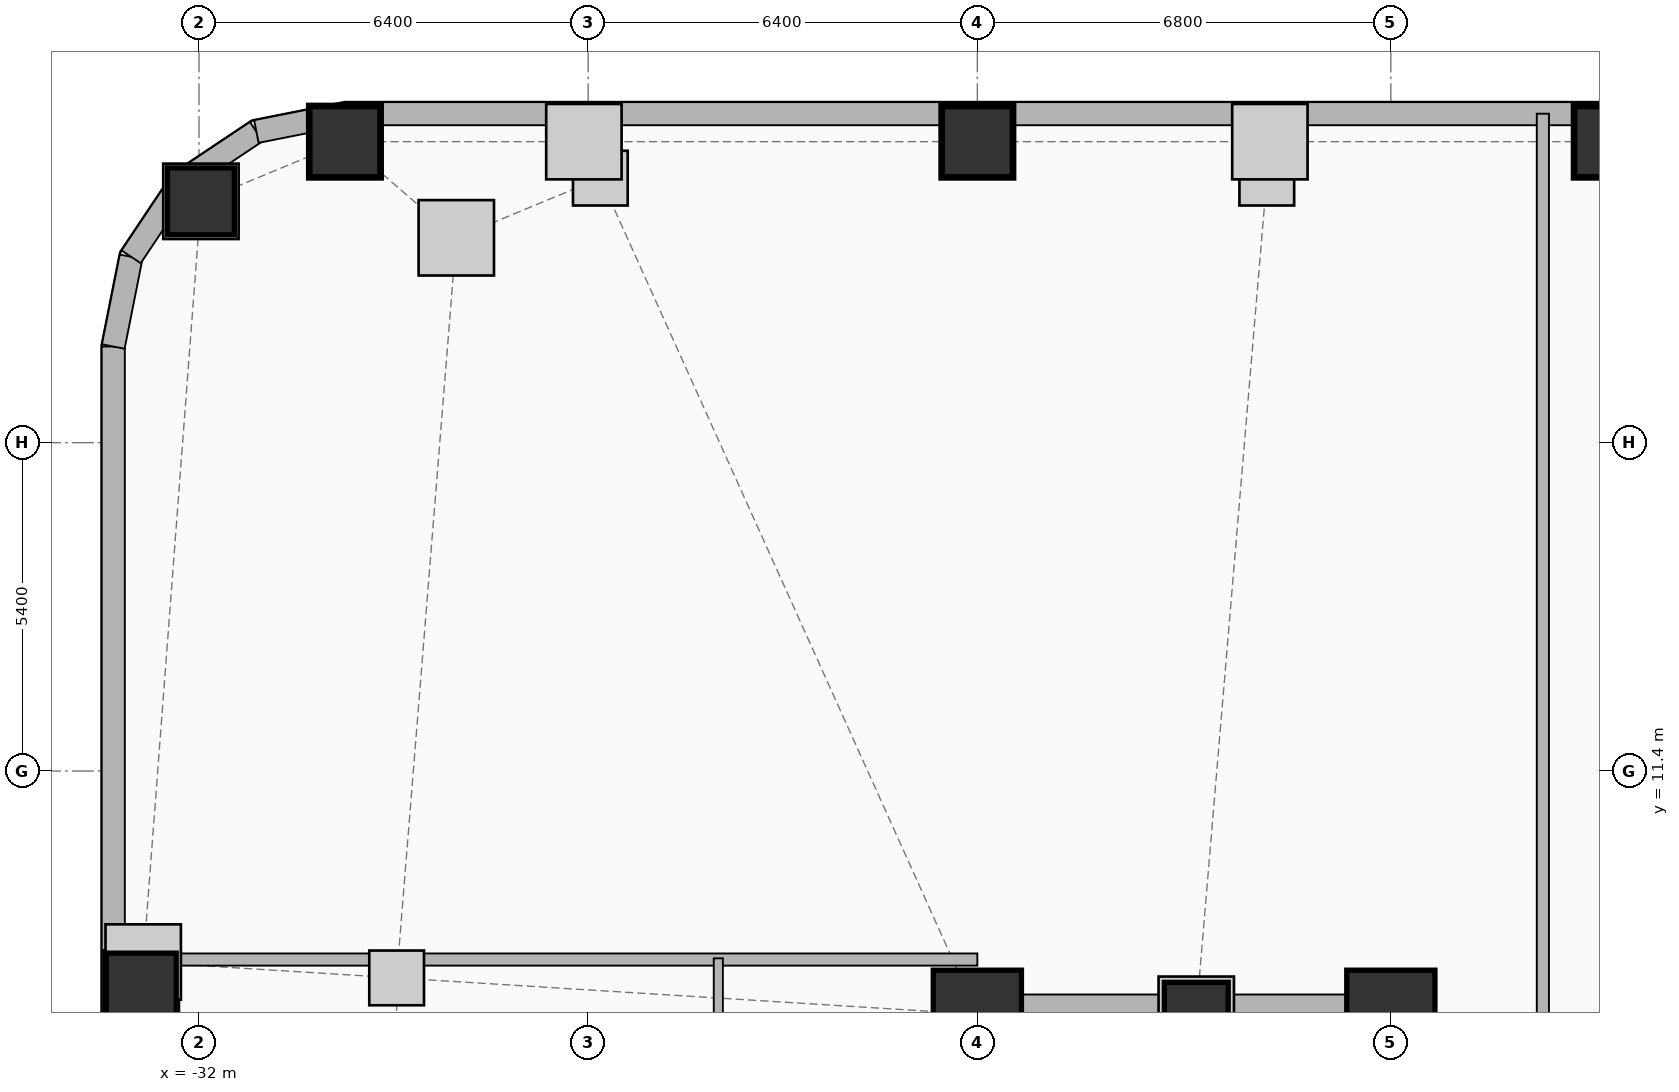
"""IFC4 building model, lengths in metres.
Left out: names, types, materials, properties, quantities, classifications, styles, units other than length and angle.
Written with IfcOpenShell. Run it as: python <this file> out.ifc"""

import sys

from ifc_helpers import new_model, si_unit, direction, frame, frame_2d, origin, origin_2d, place, context, subcontext, project, spatial, rectangle, hollow_rectangle, hollow_circle, extrude, element, fill, save


model = new_model("IFC4")
c1 = context("Model", 3, precision=1e-05, world=origin(), true_north=direction((0.0, 1.0)))
c2 = subcontext(c1, "Body", "Model", "MODEL_VIEW")
j1 = project(units=[si_unit("LENGTHUNIT", "METRE"), si_unit("PLANEANGLEUNIT", "RADIAN")], contexts=[c1])
p1 = place(None, origin())
s1 = spatial("IfcSite", under=j1, at=p1, CompositionType="ELEMENT")
p2 = place(p1, origin())
s2 = spatial("IfcBuilding", under=s1, at=p2, CompositionType="ELEMENT")
p3 = place(p2, frame((0.0, 0.0, 80.6)))
s3 = spatial("IfcBuildingStorey", under=s2, at=p3, CompositionType="ELEMENT", Elevation=80.6)
p4 = place(p3, frame((-19.2, 7.4, 0.0), z_axis=(0.0, 0.0, 1.0), x_axis=(1.0, 0.0, 0.0)))
e1 = element("IfcColumn", 1, at=p4, inside=s3, PredefinedType="COLUMN", context=c2, shape_type="SweptSolid", body=[
    extrude(rectangle(XDim=1.45, YDim=1.45, at=origin_2d()), origin(), (0.0, 0.0, 1.0), 5.2),
])
p5 = place(p3, frame((-15.6, 7.4, 0.0), z_axis=(0.0, 0.0, 1.0), x_axis=(1.0, 0.0, 0.0)))
e2 = element("IfcColumn", 2, at=p5, inside=s3, PredefinedType="COLUMN", context=c2, shape_type="SweptSolid", body=[
    extrude(rectangle(XDim=1.05, YDim=1.05, at=origin_2d()), origin(), (0.0, 0.0, 1.0), 5.2),
])
p6 = place(p3, frame((-12.4, 7.4, 0.0), z_axis=(0.0, 0.0, 1.0), x_axis=(1.0, 0.0, 0.0)))
e3 = element("IfcColumn", 3, at=p6, inside=s3, PredefinedType="COLUMN", context=c2, shape_type="SweptSolid", body=[
    extrude(rectangle(XDim=1.45, YDim=1.45, at=origin_2d()), origin(), (0.0, 0.0, 1.0), 5.2),
])
p7 = place(p3, frame((-19.525, 7.4, 0.0), z_axis=(0.0, 0.0, 1.0), x_axis=(1.0, 0.0, 0.0)))
e4 = element("IfcWall", 4, at=p7, inside=s3, PredefinedType="SHEAR", context=c2, shape_type="SweptSolid", body=[
    extrude(rectangle(XDim=7.45, YDim=0.65, at=frame_2d((3.725, 0.0))), origin(), (0.0, 0.0, 1.0), 4.8),
])
for number, where, z_axis, x_axis in (
    (5, (-8.8, 21.75, 0.0), (0.0, 0.0, 1.0), (1.0, 0.0, 0.0)),
    (6, (-19.2, 21.75, 0.0), (0.0, 0.0, 1.0), (1.0, 0.0, 0.0)),
    (7, (-29.6, 21.75, 0.0), (0.0, 0.0, 1.0), (1.0, 0.0, 0.0)),
):
    element("IfcColumn", number, at=place(p3, frame(where, z_axis=z_axis, x_axis=x_axis)), inside=s3, PredefinedType="COLUMN", context=c2, shape_type="SweptSolid", body=[
        extrude(hollow_rectangle(XDim=1.15, YDim=1.15, WallThickness=0.04, at=origin_2d()), origin(), (0.0, 0.0, 1.0), 5.165),
    ])
p8 = place(p3, frame((-31.969, 20.769, 0.0), z_axis=(0.0, 0.0, 1.0), x_axis=(1.0, 0.0, 0.0)))
e8 = element("IfcColumn", 8, at=p8, inside=s3, PredefinedType="COLUMN", context=c2, shape_type="SweptSolid", body=[
    extrude(hollow_circle(Radius=0.55, WallThickness=0.036, at=origin_2d()), origin(), (0.0, 0.0, 1.0), 5.165),
])
p9 = place(p3, frame((-32.95, 7.83, 0.0), z_axis=(0.0, 0.0, 1.0), x_axis=(1.0, 0.0, 0.0)))
e9 = element("IfcColumn", 9, at=p9, inside=s3, PredefinedType="COLUMN", context=c2, shape_type="SweptSolid", body=[
    extrude(hollow_rectangle(XDim=1.15, YDim=1.15, WallThickness=0.04, at=origin_2d()), origin(), (0.0, 0.0, 1.0), 5.165),
])
p10 = place(p3, frame((-33.41, -18.381, 0.0), z_axis=(0.0, 0.0, 1.0), x_axis=(0.0, 1.0, 0.0)))
e10 = element("IfcWall", 10, at=p10, inside=s3, PredefinedType="ELEMENTEDWALL", context=c2, shape_type="SweptSolid", body=[
    extrude(rectangle(XDim=36.763, YDim=0.38, at=frame_2d((18.381, 0.0))), origin(), (0.0, 0.0, 1.0), 3.69),
])
p11 = place(p10, frame((1.498, 0.0, 0.75)))
e11 = element("IfcOpeningElement", 11, at=p11, cuts=e10, PredefinedType="OPENING", context=c2, shape_type="SweptSolid", body=[
    extrude(rectangle(XDim=1.6, YDim=1.4, at=frame_2d((0.8, 0.7))), frame((0.0, 0.2, 0.0), z_axis=(0.0, -1.0, 0.0), x_axis=(1.0, 0.0, 0.0)), (0.0, 0.0, 1.0), 0.4),
])
p12 = place(p10, frame((6.093, 0.0, 0.75)))
e12 = element("IfcOpeningElement", 12, at=p12, cuts=e10, PredefinedType="OPENING", context=c2, shape_type="SweptSolid", body=[
    extrude(rectangle(XDim=1.6, YDim=1.4, at=frame_2d((0.8, 0.7))), frame((0.0, 0.2, 0.0), z_axis=(0.0, -1.0, 0.0), x_axis=(1.0, 0.0, 0.0)), (0.0, 0.0, 1.0), 0.4),
])
p13 = place(p10, frame((15.284, 0.0, 0.75)))
e13 = element("IfcOpeningElement", 13, at=p13, cuts=e10, PredefinedType="OPENING", context=c2, shape_type="SweptSolid", body=[
    extrude(rectangle(XDim=1.6, YDim=1.4, at=frame_2d((0.8, 0.7))), frame((0.0, 0.2, 0.0), z_axis=(0.0, -1.0, 0.0), x_axis=(1.0, 0.0, 0.0)), (0.0, 0.0, 1.0), 0.4),
])
p14 = place(p10, frame((19.879, 0.0, 0.75)))
e14 = element("IfcOpeningElement", 14, at=p14, cuts=e10, PredefinedType="OPENING", context=c2, shape_type="SweptSolid", body=[
    extrude(rectangle(XDim=1.6, YDim=1.4, at=frame_2d((0.8, 0.7))), frame((0.0, 0.2, 0.0), z_axis=(0.0, -1.0, 0.0), x_axis=(1.0, 0.0, 0.0)), (0.0, 0.0, 1.0), 0.4),
])
p15 = place(p10, frame((29.07, 0.0, 0.75)))
e15 = element("IfcOpeningElement", 15, at=p15, cuts=e10, PredefinedType="OPENING", context=c2, shape_type="SweptSolid", body=[
    extrude(rectangle(XDim=1.6, YDim=1.4, at=frame_2d((0.8, 0.7))), frame((0.0, 0.2, 0.0), z_axis=(0.0, -1.0, 0.0), x_axis=(1.0, 0.0, 0.0)), (0.0, 0.0, 1.0), 0.4),
])
p16 = place(p10, frame((33.665, 0.0, 0.75)))
e16 = element("IfcOpeningElement", 16, at=p16, cuts=e10, PredefinedType="OPENING", context=c2, shape_type="SweptSolid", body=[
    extrude(rectangle(XDim=1.6, YDim=1.4, at=frame_2d((0.8, 0.7))), frame((0.0, 0.2, 0.0), z_axis=(0.0, -1.0, 0.0), x_axis=(1.0, 0.0, 0.0)), (0.0, 0.0, 1.0), 0.4),
])
p17 = place(p3, frame((-33.41, 18.381, 0.0), z_axis=(0.0, 0.0, 1.0), x_axis=(0.195086038585, 0.980786132421, 0.0)))
e17 = element("IfcWall", 17, at=p17, inside=s3, PredefinedType="ELEMENTEDWALL", context=c2, shape_type="SweptSolid", body=[
    extrude(rectangle(XDim=1.504, YDim=0.38, at=frame_2d((0.752, 0.0))), origin(), (0.0, 0.0, 1.0), 4.8),
])
p18 = place(p3, frame((-33.116, 19.857, 0.0), z_axis=(0.0, 0.0, 1.0), x_axis=(0.555572577804, 0.831468045563, 0.0)))
e18 = element("IfcWall", 18, at=p18, inside=s3, PredefinedType="ELEMENTEDWALL", context=c2, shape_type="SweptSolid", body=[
    extrude(rectangle(XDim=1.485, YDim=0.38, at=frame_2d((0.742, 0.0))), origin(), (0.0, 0.0, 1.0), 4.8),
])
p19 = place(p3, frame((-32.292, 21.091, 0.0), z_axis=(0.0, 0.0, 1.0), x_axis=(0.831442848281, 0.555610286119, 0.0)))
e19 = element("IfcWall", 19, at=p19, inside=s3, PredefinedType="ELEMENTEDWALL", context=c2, shape_type="SweptSolid", body=[
    extrude(rectangle(XDim=1.485, YDim=0.38, at=frame_2d((0.743, 0.0))), origin(), (0.0, 0.0, 1.0), 3.69),
])
p20 = place(p3, frame((-31.057, 21.917, 0.0), z_axis=(0.0, 0.0, 1.0), x_axis=(0.980786132421, 0.195086038585, 0.0)))
e20 = element("IfcWall", 20, at=p20, inside=s3, PredefinedType="ELEMENTEDWALL", context=c2, shape_type="SweptSolid", body=[
    extrude(rectangle(XDim=1.504, YDim=0.38, at=frame_2d((0.752, 0.0))), origin(), (0.0, 0.0, 1.0), 3.69),
])
p21 = place(p3, frame((-29.581, 22.21, 0.0), z_axis=(0.0, 0.0, 1.0), x_axis=(1.0, 0.0, 0.0)))
e21 = element("IfcWall", 21, at=p21, inside=s3, PredefinedType="ELEMENTEDWALL", context=c2, shape_type="SweptSolid", body=[
    extrude(rectangle(XDim=51.963, YDim=0.38, at=frame_2d((25.981, 0.0))), origin(), (0.0, 0.0, 1.0), 3.69),
])
p22 = place(p21, frame((1.365, 0.0, 0.75)))
e22 = element("IfcOpeningElement", 22, at=p22, cuts=e21, PredefinedType="OPENING", context=c2, shape_type="SweptSolid", body=[
    extrude(rectangle(XDim=1.6, YDim=1.4, at=frame_2d((0.8, 0.7))), frame((0.0, 0.2, 0.0), z_axis=(0.0, -1.0, 0.0), x_axis=(1.0, 0.0, 0.0)), (0.0, 0.0, 1.0), 0.4),
])
p23 = place(p21, frame((5.695, 0.0, 0.75)))
e23 = element("IfcOpeningElement", 23, at=p23, cuts=e21, PredefinedType="OPENING", context=c2, shape_type="SweptSolid", body=[
    extrude(rectangle(XDim=1.6, YDim=1.4, at=frame_2d((0.8, 0.7))), frame((0.0, 0.2, 0.0), z_axis=(0.0, -1.0, 0.0), x_axis=(1.0, 0.0, 0.0)), (0.0, 0.0, 1.0), 0.4),
])
p24 = place(p21, frame((14.356, 0.0, 0.75)))
e24 = element("IfcOpeningElement", 24, at=p24, cuts=e21, PredefinedType="OPENING", context=c2, shape_type="SweptSolid", body=[
    extrude(rectangle(XDim=1.6, YDim=1.4, at=frame_2d((0.8, 0.7))), frame((0.0, 0.2, 0.0), z_axis=(0.0, -1.0, 0.0), x_axis=(1.0, 0.0, 0.0)), (0.0, 0.0, 1.0), 0.4),
])
p25 = place(p21, frame((23.016, 0.0, 0.75)))
e25 = element("IfcOpeningElement", 25, at=p25, cuts=e21, PredefinedType="OPENING", context=c2, shape_type="SweptSolid", body=[
    extrude(rectangle(XDim=1.6, YDim=1.4, at=frame_2d((0.8, 0.7))), frame((0.0, 0.2, 0.0), z_axis=(0.0, -1.0, 0.0), x_axis=(1.0, 0.0, 0.0)), (0.0, 0.0, 1.0), 0.4),
])
p26 = place(p21, frame((27.346, 0.0, 0.75)))
e26 = element("IfcOpeningElement", 26, at=p26, cuts=e21, PredefinedType="OPENING", context=c2, shape_type="SweptSolid", body=[
    extrude(rectangle(XDim=1.6, YDim=1.4, at=frame_2d((0.8, 0.7))), frame((0.0, 0.2, 0.0), z_axis=(0.0, -1.0, 0.0), x_axis=(1.0, 0.0, 0.0)), (0.0, 0.0, 1.0), 0.4),
])
p27 = place(p21, frame((36.007, 0.0, 0.75)))
e27 = element("IfcOpeningElement", 27, at=p27, cuts=e21, PredefinedType="OPENING", context=c2, shape_type="SweptSolid", body=[
    extrude(rectangle(XDim=1.6, YDim=1.4, at=frame_2d((0.8, 0.7))), frame((0.0, 0.2, 0.0), z_axis=(0.0, -1.0, 0.0), x_axis=(1.0, 0.0, 0.0)), (0.0, 0.0, 1.0), 0.4),
])
p28 = place(p21, frame((44.667, 0.0, 0.75)))
e28 = element("IfcOpeningElement", 28, at=p28, cuts=e21, PredefinedType="OPENING", context=c2, shape_type="SweptSolid", body=[
    extrude(rectangle(XDim=1.6, YDim=1.4, at=frame_2d((0.8, 0.7))), frame((0.0, 0.2, 0.0), z_axis=(0.0, -1.0, 0.0), x_axis=(1.0, 0.0, 0.0)), (0.0, 0.0, 1.0), 0.4),
])
p29 = place(p21, frame((48.998, 0.0, 0.75)))
e29 = element("IfcOpeningElement", 29, at=p29, cuts=e21, PredefinedType="OPENING", context=c2, shape_type="SweptSolid", body=[
    extrude(rectangle(XDim=1.6, YDim=1.4, at=frame_2d((0.8, 0.7))), frame((0.0, 0.2, 0.0), z_axis=(0.0, -1.0, 0.0), x_axis=(1.0, 0.0, 0.0)), (0.0, 0.0, 1.0), 0.4),
])
p30 = place(p3, frame((-33.41, 8.3, 0.0), z_axis=(0.0, 0.0, 1.0), x_axis=(1.0, 0.0, 0.0)))
e30 = element("IfcWall", 30, at=p30, inside=s3, PredefinedType="PARTITIONING", context=c2, shape_type="SweptSolid", body=[
    extrude(rectangle(XDim=14.21, YDim=0.2, at=frame_2d((7.105, 0.0))), origin(), (0.0, 0.0, 1.0), 3.69),
])
p31 = place(p3, frame((-23.46, 4.82, 0.0), z_axis=(0.0, 0.0, 1.0), x_axis=(0.0, 1.0, 0.0)))
e31 = element("IfcWall", 31, at=p31, inside=s3, PredefinedType="PLUMBINGWALL", context=c2, shape_type="SweptSolid", body=[
    extrude(rectangle(XDim=3.5, YDim=0.15, at=frame_2d((1.75, 0.0))), origin(), (0.0, 0.0, 1.0), 4.8),
])
p32 = place(p31, frame((1.25, 0.0, 0.0)))
e32 = element("IfcOpeningElement", 32, at=p32, cuts=e31, PredefinedType="OPENING", context=c2, shape_type="SweptSolid", body=[
    extrude(rectangle(XDim=1.0, YDim=2.05, at=frame_2d((0.5, 1.025))), frame((0.0, 0.085, 0.0), z_axis=(0.0, -1.0, 0.0), x_axis=(1.0, 0.0, 0.0)), (0.0, 0.0, 1.0), 0.17),
])
p33 = place(p3, frame((-9.9, 7.1, 0.0), z_axis=(0.0, 0.0, 1.0), x_axis=(0.0, 1.0, 0.0)))
e33 = element("IfcWall", 33, at=p33, inside=s3, PredefinedType="PARTITIONING", context=c2, shape_type="SweptSolid", body=[
    extrude(rectangle(XDim=15.11, YDim=0.2, at=frame_2d((7.555, 0.0))), origin(), (0.0, 0.0, 1.0), 4.8),
])
p34 = place(p33, frame((8.239, 0.0, 0.0)))
e34 = element("IfcOpeningElement", 34, at=p34, cuts=e33, PredefinedType="OPENING", context=c2, shape_type="SweptSolid", body=[
    extrude(rectangle(XDim=1.05, YDim=2.05, at=frame_2d((0.525, 1.025))), frame((0.0, 0.11, 0.0), z_axis=(0.0, -1.0, 0.0), x_axis=(1.0, 0.0, 0.0)), (0.0, 0.0, 1.0), 0.22),
])
p35 = place(p15, origin())
e35 = element("IfcWindow", 35, at=p35, inside=s3, PartitioningType="SINGLE_PANEL", PredefinedType="WINDOW", context=c2, shape_type="SweptSolid", body=[
    extrude(rectangle(XDim=1.6, YDim=1.4, at=frame_2d((0.8, 0.7))), frame((0.0, 0.03, 0.0), z_axis=(0.0, -1.0, 0.0), x_axis=(1.0, 0.0, 0.0)), (0.0, 0.0, 1.0), 0.06),
])
fill(e15, e35)
p36 = place(p16, origin())
e36 = element("IfcWindow", 36, at=p36, inside=s3, PartitioningType="SINGLE_PANEL", PredefinedType="WINDOW", context=c2, shape_type="SweptSolid", body=[
    extrude(rectangle(XDim=1.6, YDim=1.4, at=frame_2d((0.8, 0.7))), frame((0.0, 0.03, 0.0), z_axis=(0.0, -1.0, 0.0), x_axis=(1.0, 0.0, 0.0)), (0.0, 0.0, 1.0), 0.06),
])
fill(e16, e36)
p37 = place(p22, origin())
e37 = element("IfcWindow", 37, at=p37, inside=s3, PartitioningType="SINGLE_PANEL", PredefinedType="WINDOW", context=c2, shape_type="SweptSolid", body=[
    extrude(rectangle(XDim=1.6, YDim=1.4, at=frame_2d((0.8, 0.7))), frame((0.0, 0.03, 0.0), z_axis=(0.0, -1.0, 0.0), x_axis=(1.0, 0.0, 0.0)), (0.0, 0.0, 1.0), 0.06),
])
fill(e22, e37)
p38 = place(p23, origin())
e38 = element("IfcWindow", 38, at=p38, inside=s3, PartitioningType="SINGLE_PANEL", PredefinedType="WINDOW", context=c2, shape_type="SweptSolid", body=[
    extrude(rectangle(XDim=1.6, YDim=1.4, at=frame_2d((0.8, 0.7))), frame((0.0, 0.03, 0.0), z_axis=(0.0, -1.0, 0.0), x_axis=(1.0, 0.0, 0.0)), (0.0, 0.0, 1.0), 0.06),
])
fill(e23, e38)
p39 = place(p24, origin())
e39 = element("IfcWindow", 39, at=p39, inside=s3, PartitioningType="SINGLE_PANEL", PredefinedType="WINDOW", context=c2, shape_type="SweptSolid", body=[
    extrude(rectangle(XDim=1.6, YDim=1.4, at=frame_2d((0.8, 0.7))), frame((0.0, 0.03, 0.0), z_axis=(0.0, -1.0, 0.0), x_axis=(1.0, 0.0, 0.0)), (0.0, 0.0, 1.0), 0.06),
])
fill(e24, e39)
p40 = place(p34, origin())
e40 = element("IfcDoor", 40, at=p40, inside=s3, OperationType="SINGLE_SWING_LEFT", PredefinedType="DOOR", context=c2, shape_type="SweptSolid", body=[
    extrude(rectangle(XDim=1.05, YDim=2.05, at=frame_2d((0.525, 1.025))), frame((0.0, 0.025, 0.0), z_axis=(0.0, -1.0, 0.0), x_axis=(1.0, 0.0, 0.0)), (0.0, 0.0, 1.0), 0.05),
])
fill(e34, e40)
save(model, sys.argv[1])
